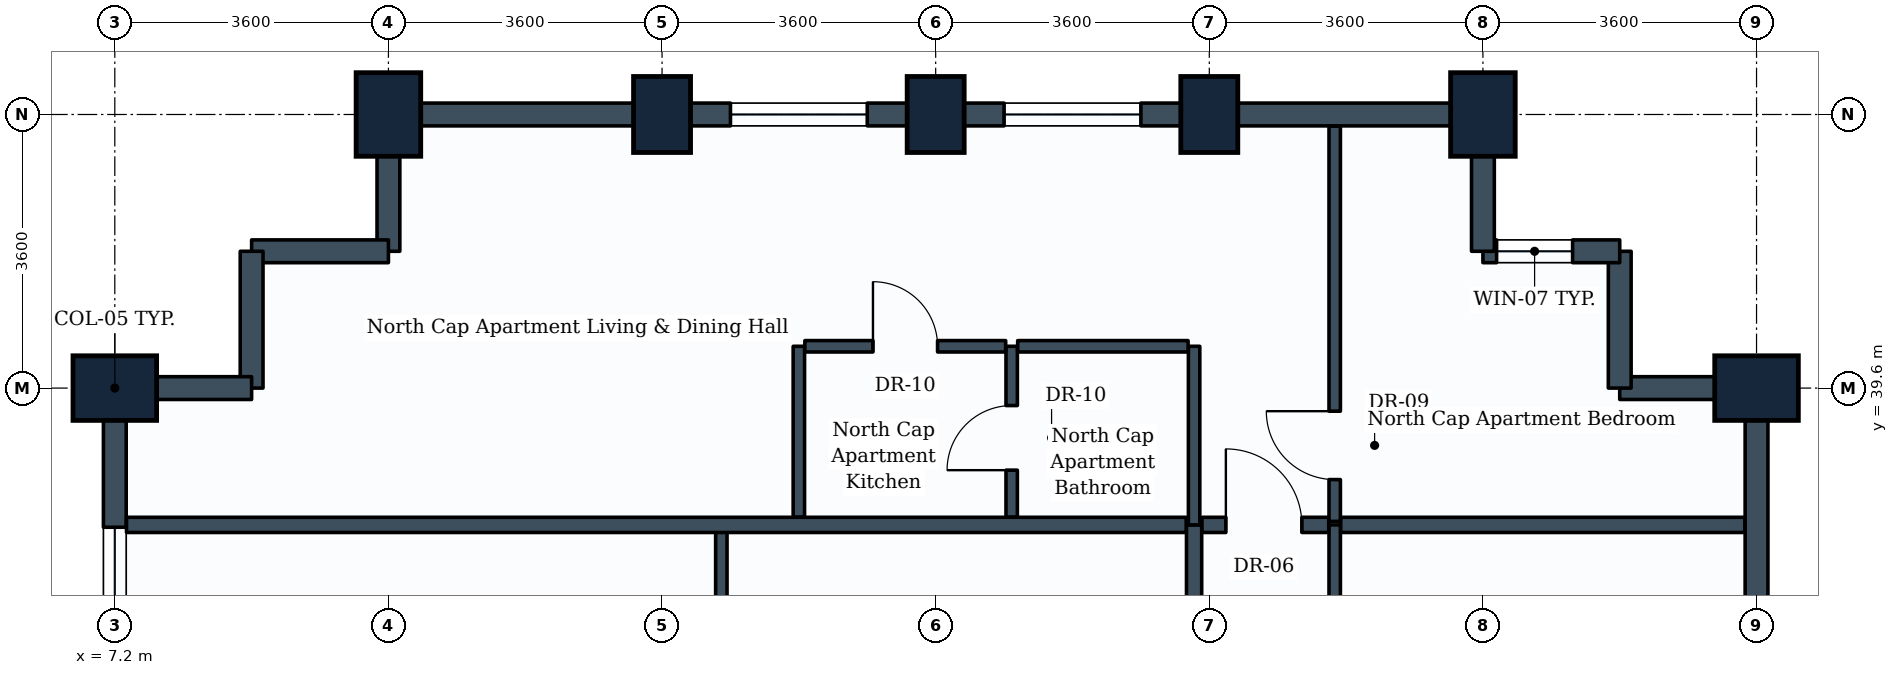
"""IFC4 building model, lengths in metres.
Left out: names, types, materials, properties, quantities, classifications, styles, units other than length and angle.
Written with IfcOpenShell. Run it as: python <this file> out.ifc"""

import sys

from ifc_helpers import new_model, si_unit, direction, frame, frame_2d, origin, origin_2d, place, context, subcontext, project, spatial, rectangle, extrude, element, fill, save


model = new_model("IFC4")
c1 = context("Model", 3, precision=1e-05, world=origin(), true_north=direction((0.0, 1.0)))
c2 = subcontext(c1, "Body", "Model", "MODEL_VIEW")
j1 = project(units=[si_unit("LENGTHUNIT", "METRE"), si_unit("PLANEANGLEUNIT", "RADIAN")], contexts=[c1])
p1 = place(None, origin())
s1 = spatial("IfcSite", under=j1, at=p1, CompositionType="ELEMENT")
p2 = place(p1, origin())
s2 = spatial("IfcBuilding", under=s1, at=p2, CompositionType="ELEMENT")
p3 = place(p2, frame((0.0, 0.0, 165.6)))
s3 = spatial("IfcBuildingStorey", under=s2, at=p3, CompositionType="ELEMENT", Elevation=165.6)
for number, where, z_axis, x_axis in (
    (1, (7.2, 39.6, 0.0), (0.0, 0.0, 1.0), (0.0, 1.0, 0.0)),
    (2, (10.8, 43.2, 0.0), (0.0, 0.0, 1.0), (1.0, 0.0, 0.0)),
):
    element("IfcColumn", number, at=place(p3, frame(where, z_axis=z_axis, x_axis=x_axis)), inside=s3, PredefinedType="COLUMN", context=c2, shape_type="SweptSolid", body=[
        extrude(rectangle(XDim=0.85, YDim=1.1, at=origin_2d()), origin(), (0.0, 0.0, 1.0), 3.8),
    ])
for number, where, z_axis, x_axis in (
    (3, (14.4, 43.2, 0.0), (0.0, 0.0, 1.0), (1.0, 0.0, 0.0)),
    (4, (18.0, 43.2, 0.0), (0.0, 0.0, 1.0), (1.0, 0.0, 0.0)),
    (5, (21.6, 43.2, 0.0), (0.0, 0.0, 1.0), (1.0, 0.0, 0.0)),
):
    element("IfcColumn", number, at=place(p3, frame(where, z_axis=z_axis, x_axis=x_axis)), inside=s3, PredefinedType="COLUMN", context=c2, shape_type="SweptSolid", body=[
        extrude(rectangle(XDim=0.75, YDim=1.0, at=origin_2d()), origin(), (0.0, 0.0, 1.0), 3.8),
    ])
for number, where, z_axis, x_axis in (
    (6, (25.2, 43.2, 0.0), (0.0, 0.0, 1.0), (1.0, 0.0, 0.0)),
    (7, (28.8, 39.6, 0.0), (0.0, 0.0, 1.0), (0.0, 1.0, 0.0)),
):
    element("IfcColumn", number, at=place(p3, frame(where, z_axis=z_axis, x_axis=x_axis)), inside=s3, PredefinedType="COLUMN", context=c2, shape_type="SweptSolid", body=[
        extrude(rectangle(XDim=0.85, YDim=1.1, at=origin_2d()), origin(), (0.0, 0.0, 1.0), 3.8),
    ])
p4 = place(p3, frame((28.8, 39.6, 0.0), z_axis=(0.0, 0.0, 1.0), x_axis=(0.0, -1.0, 0.0)))
e8 = element("IfcWall", 8, at=p4, inside=s3, PredefinedType="STANDARD", context=c2, shape_type="SweptSolid", body=[
    extrude(rectangle(XDim=3.6, YDim=0.3, at=frame_2d((1.8, 0.0))), origin(), (0.0, 0.0, 1.0), 2.93),
])
p5 = place(p3, frame((27.0, 39.6, 0.0), z_axis=(0.0, 0.0, 1.0), x_axis=(1.0, 0.0, 0.0)))
e9 = element("IfcWall", 9, at=p5, inside=s3, PredefinedType="STANDARD", context=c2, shape_type="SweptSolid", body=[
    extrude(rectangle(XDim=1.8, YDim=0.3, at=frame_2d((0.9, 0.0))), origin(), (0.0, 0.0, 1.0), 2.93),
])
p6 = place(p3, frame((27.0, 39.6, 0.0), z_axis=(0.0, 0.0, 1.0), x_axis=(0.0, 1.0, 0.0)))
e10 = element("IfcWall", 10, at=p6, inside=s3, PredefinedType="STANDARD", context=c2, shape_type="SweptSolid", body=[
    extrude(rectangle(XDim=1.8, YDim=0.3, at=frame_2d((0.9, 0.0))), origin(), (0.0, 0.0, 1.0), 3.465),
])
p7 = place(p3, frame((25.2, 41.4, 0.0), z_axis=(0.0, 0.0, 1.0), x_axis=(1.0, 0.0, 0.0)))
e11 = element("IfcWall", 11, at=p7, inside=s3, PredefinedType="STANDARD", context=c2, shape_type="SweptSolid", body=[
    extrude(rectangle(XDim=1.8, YDim=0.3, at=frame_2d((0.9, 0.0))), origin(), (0.0, 0.0, 1.0), 3.465),
])
p8 = place(p7, frame((0.18, 0.0, 0.85)))
e12 = element("IfcOpeningElement", 12, at=p8, cuts=e11, PredefinedType="OPENING", context=c2, shape_type="SweptSolid", body=[
    extrude(rectangle(XDim=1.0, YDim=1.35, at=frame_2d((0.5, 0.675))), frame((0.0, 0.16, 0.0), z_axis=(0.0, -1.0, 0.0), x_axis=(1.0, 0.0, 0.0)), (0.0, 0.0, 1.0), 0.32),
])
p9 = place(p3, frame((25.2, 41.4, 0.0), z_axis=(0.0, 0.0, 1.0), x_axis=(0.0, 1.0, 0.0)))
e13 = element("IfcWall", 13, at=p9, inside=s3, PredefinedType="STANDARD", context=c2, shape_type="SweptSolid", body=[
    extrude(rectangle(XDim=1.8, YDim=0.3, at=frame_2d((0.9, 0.0))), origin(), (0.0, 0.0, 1.0), 2.93),
])
p10 = place(p3, frame((21.6, 43.2, 0.0), z_axis=(0.0, 0.0, 1.0), x_axis=(1.0, 0.0, 0.0)))
e14 = element("IfcWall", 14, at=p10, inside=s3, PredefinedType="STANDARD", context=c2, shape_type="SweptSolid", body=[
    extrude(rectangle(XDim=3.6, YDim=0.3, at=frame_2d((1.8, 0.0))), origin(), (0.0, 0.0, 1.0), 2.93),
])
p11 = place(p3, frame((18.0, 43.2, 0.0), z_axis=(0.0, 0.0, 1.0), x_axis=(1.0, 0.0, 0.0)))
e15 = element("IfcWall", 15, at=p11, inside=s3, PredefinedType="STANDARD", context=c2, shape_type="SweptSolid", body=[
    extrude(rectangle(XDim=3.6, YDim=0.3, at=frame_2d((1.8, 0.0))), origin(), (0.0, 0.0, 1.0), 2.93),
])
p12 = place(p11, frame((0.9, 0.0, 0.85)))
e16 = element("IfcOpeningElement", 16, at=p12, cuts=e15, PredefinedType="OPENING", context=c2, shape_type="SweptSolid", body=[
    extrude(rectangle(XDim=1.8, YDim=1.35, at=frame_2d((0.9, 0.675))), frame((0.0, 0.16, 0.0), z_axis=(0.0, -1.0, 0.0), x_axis=(1.0, 0.0, 0.0)), (0.0, 0.0, 1.0), 0.32),
])
p13 = place(p3, frame((14.4, 43.2, 0.0), z_axis=(0.0, 0.0, 1.0), x_axis=(1.0, 0.0, 0.0)))
e17 = element("IfcWall", 17, at=p13, inside=s3, PredefinedType="STANDARD", context=c2, shape_type="SweptSolid", body=[
    extrude(rectangle(XDim=3.6, YDim=0.3, at=frame_2d((1.8, 0.0))), origin(), (0.0, 0.0, 1.0), 2.93),
])
p14 = place(p13, frame((0.9, 0.0, 0.85)))
e18 = element("IfcOpeningElement", 18, at=p14, cuts=e17, PredefinedType="OPENING", context=c2, shape_type="SweptSolid", body=[
    extrude(rectangle(XDim=1.8, YDim=1.35, at=frame_2d((0.9, 0.675))), frame((0.0, 0.16, 0.0), z_axis=(0.0, -1.0, 0.0), x_axis=(1.0, 0.0, 0.0)), (0.0, 0.0, 1.0), 0.32),
])
p15 = place(p3, frame((10.8, 43.2, 0.0), z_axis=(0.0, 0.0, 1.0), x_axis=(1.0, 0.0, 0.0)))
e19 = element("IfcWall", 19, at=p15, inside=s3, PredefinedType="STANDARD", context=c2, shape_type="SweptSolid", body=[
    extrude(rectangle(XDim=3.6, YDim=0.3, at=frame_2d((1.8, 0.0))), origin(), (0.0, 0.0, 1.0), 2.93),
])
p16 = place(p3, frame((10.8, 41.4, 0.0), z_axis=(0.0, 0.0, 1.0), x_axis=(0.0, 1.0, 0.0)))
e20 = element("IfcWall", 20, at=p16, inside=s3, PredefinedType="STANDARD", context=c2, shape_type="SweptSolid", body=[
    extrude(rectangle(XDim=1.8, YDim=0.3, at=frame_2d((0.9, 0.0))), origin(), (0.0, 0.0, 1.0), 2.93),
])
p17 = place(p3, frame((9.0, 41.4, 0.0), z_axis=(0.0, 0.0, 1.0), x_axis=(1.0, 0.0, 0.0)))
e21 = element("IfcWall", 21, at=p17, inside=s3, PredefinedType="STANDARD", context=c2, shape_type="SweptSolid", body=[
    extrude(rectangle(XDim=1.8, YDim=0.3, at=frame_2d((0.9, 0.0))), origin(), (0.0, 0.0, 1.0), 3.465),
])
p18 = place(p3, frame((9.0, 39.6, 0.0), z_axis=(0.0, 0.0, 1.0), x_axis=(0.0, 1.0, 0.0)))
e22 = element("IfcWall", 22, at=p18, inside=s3, PredefinedType="STANDARD", context=c2, shape_type="SweptSolid", body=[
    extrude(rectangle(XDim=1.8, YDim=0.3, at=frame_2d((0.9, 0.0))), origin(), (0.0, 0.0, 1.0), 3.465),
])
p19 = place(p3, frame((7.2, 39.6, 0.0), z_axis=(0.0, 0.0, 1.0), x_axis=(1.0, 0.0, 0.0)))
e23 = element("IfcWall", 23, at=p19, inside=s3, PredefinedType="STANDARD", context=c2, shape_type="SweptSolid", body=[
    extrude(rectangle(XDim=1.8, YDim=0.3, at=frame_2d((0.9, 0.0))), origin(), (0.0, 0.0, 1.0), 2.93),
])
p20 = place(p3, frame((7.2, 36.0, 0.0), z_axis=(0.0, 0.0, 1.0), x_axis=(0.0, 1.0, 0.0)))
e24 = element("IfcWall", 24, at=p20, inside=s3, PredefinedType="STANDARD", context=c2, shape_type="SweptSolid", body=[
    extrude(rectangle(XDim=3.6, YDim=0.3, at=frame_2d((1.8, 0.0))), origin(), (0.0, 0.0, 1.0), 2.93),
])
p21 = place(p20, frame((0.769, 0.0, 0.85)))
e25 = element("IfcOpeningElement", 25, at=p21, cuts=e24, PredefinedType="OPENING", context=c2, shape_type="SweptSolid", body=[
    extrude(rectangle(XDim=1.0, YDim=1.35, at=frame_2d((0.5, 0.675))), frame((0.0, 0.16, 0.0), z_axis=(0.0, -1.0, 0.0), x_axis=(1.0, 0.0, 0.0)), (0.0, 0.0, 1.0), 0.32),
])
p22 = place(p3, frame((21.4, 34.26, 0.0), z_axis=(0.0, 0.0, 1.0), x_axis=(0.0, 1.0, 0.0)))
e26 = element("IfcWall", 26, at=p22, inside=s3, PredefinedType="PARTITIONING", context=c2, shape_type="SweptSolid", body=[
    extrude(rectangle(XDim=3.54, YDim=0.2, at=frame_2d((1.77, 0.0))), origin(), (0.0, 0.0, 1.0), 3.1),
])
p23 = place(p22, frame((1.23, 0.0, 0.0)))
e27 = element("IfcOpeningElement", 27, at=p23, cuts=e26, PredefinedType="OPENING", context=c2, shape_type="SweptSolid", body=[
    extrude(rectangle(XDim=1.0, YDim=2.1, at=frame_2d((0.5, 1.05))), frame((0.0, 0.11, 0.0), z_axis=(0.0, -1.0, 0.0), x_axis=(1.0, 0.0, 0.0)), (0.0, 0.0, 1.0), 0.22),
])
p24 = place(p3, frame((15.18, 34.46, 0.0), z_axis=(0.0, 0.0, 1.0), x_axis=(0.0, 1.0, 0.0)))
e28 = element("IfcWall", 28, at=p24, inside=s3, PredefinedType="PARTITIONING", context=c2, shape_type="SweptSolid", body=[
    extrude(rectangle(XDim=3.34, YDim=0.15, at=frame_2d((1.67, 0.0))), origin(), (0.0, 0.0, 1.0), 3.1),
])
p25 = place(p24, frame((1.22, 0.0, 0.0)))
e29 = element("IfcOpeningElement", 29, at=p25, cuts=e28, PredefinedType="OPENING", context=c2, shape_type="SweptSolid", body=[
    extrude(rectangle(XDim=0.9, YDim=2.1, at=frame_2d((0.45, 1.05))), frame((0.0, 0.085, 0.0), z_axis=(0.0, -1.0, 0.0), x_axis=(1.0, 0.0, 0.0)), (0.0, 0.0, 1.0), 0.17),
])
p26 = place(p3, frame((23.25, 26.879, 0.0), z_axis=(0.0, 0.0, 1.0), x_axis=(0.0, 1.0, 0.0)))
e30 = element("IfcWall", 30, at=p26, inside=s3, PredefinedType="PARTITIONING", context=c2, shape_type="SweptSolid", body=[
    extrude(rectangle(XDim=10.921, YDim=0.15, at=frame_2d((5.46, 0.0))), origin(), (0.0, 0.0, 1.0), 3.1),
])
p27 = place(p26, frame((4.881, 0.0, 0.0)))
e31 = element("IfcOpeningElement", 31, at=p27, cuts=e30, PredefinedType="OPENING", context=c2, shape_type="SweptSolid", body=[
    extrude(rectangle(XDim=1.0, YDim=2.1, at=frame_2d((0.5, 1.05))), frame((0.0, 0.085, 0.0), z_axis=(0.0, -1.0, 0.0), x_axis=(1.0, 0.0, 0.0)), (0.0, 0.0, 1.0), 0.17),
])
p28 = place(p3, frame((7.354, 37.8, 0.0), z_axis=(0.0, 0.0, 1.0), x_axis=(1.0, 0.0, 0.0)))
e32 = element("IfcWall", 32, at=p28, inside=s3, PredefinedType="PARTITIONING", context=c2, shape_type="SweptSolid", body=[
    extrude(rectangle(XDim=13.942, YDim=0.2, at=frame_2d((6.971, 0.0))), origin(), (0.0, 0.0, 1.0), 2.93),
])
p29 = place(p3, frame((23.329, 37.8, 0.0), z_axis=(0.0, 0.0, 1.0), x_axis=(1.0, 0.0, 0.0)))
e33 = element("IfcWall", 33, at=p29, inside=s3, PredefinedType="PARTITIONING", context=c2, shape_type="SweptSolid", body=[
    extrude(rectangle(XDim=5.317, YDim=0.2, at=frame_2d((2.658, 0.0))), origin(), (0.0, 0.0, 1.0), 2.93),
])
p30 = place(p3, frame((21.504, 37.8, 0.0), z_axis=(0.0, 0.0, 1.0), x_axis=(1.0, 0.0, 0.0)))
e34 = element("IfcWall", 34, at=p30, inside=s3, PredefinedType="PARTITIONING", context=c2, shape_type="SweptSolid", body=[
    extrude(rectangle(XDim=1.667, YDim=0.2, at=frame_2d((0.833, 0.0))), origin(), (0.0, 0.0, 1.0), 3.465),
])
p31 = place(p30, frame((0.314, 0.0, 0.0)))
e35 = element("IfcOpeningElement", 35, at=p31, cuts=e34, PredefinedType="OPENING", context=c2, shape_type="SweptSolid", body=[
    extrude(rectangle(XDim=1.0, YDim=2.1, at=frame_2d((0.5, 1.05))), frame((0.0, 0.11, 0.0), z_axis=(0.0, -1.0, 0.0), x_axis=(1.0, 0.0, 0.0)), (0.0, 0.0, 1.0), 0.22),
])
p32 = place(p3, frame((21.4, 37.8, 0.0), z_axis=(0.0, 0.0, 1.0), x_axis=(0.0, 1.0, 0.0)))
e36 = element("IfcWall", 36, at=p32, inside=s3, PredefinedType="PARTITIONING", context=c2, shape_type="SweptSolid", body=[
    extrude(rectangle(XDim=2.35, YDim=0.15, at=frame_2d((1.175, 0.0))), origin(), (0.0, 0.0, 1.0), 3.465),
])
p33 = place(p3, frame((19.0, 37.904, 0.0), z_axis=(0.0, 0.0, 1.0), x_axis=(0.0, 1.0, 0.0)))
e37 = element("IfcWall", 37, at=p33, inside=s3, PredefinedType="PARTITIONING", context=c2, shape_type="SweptSolid", body=[
    extrude(rectangle(XDim=2.246, YDim=0.15, at=frame_2d((1.123, 0.0))), origin(), (0.0, 0.0, 1.0), 3.465),
])
p34 = place(p33, frame((0.616, 0.0, 0.0)))
e38 = element("IfcOpeningElement", 38, at=p34, cuts=e37, PredefinedType="OPENING", context=c2, shape_type="SweptSolid", body=[
    extrude(rectangle(XDim=0.85, YDim=2.1, at=frame_2d((0.425, 1.05))), frame((0.0, 0.085, 0.0), z_axis=(0.0, -1.0, 0.0), x_axis=(1.0, 0.0, 0.0)), (0.0, 0.0, 1.0), 0.17),
])
p35 = place(p3, frame((19.079, 40.15, 0.0), z_axis=(0.0, 0.0, 1.0), x_axis=(1.0, 0.0, 0.0)))
e39 = element("IfcWall", 39, at=p35, inside=s3, PredefinedType="PARTITIONING", context=c2, shape_type="SweptSolid", body=[
    extrude(rectangle(XDim=2.242, YDim=0.15, at=frame_2d((1.121, 0.0))), origin(), (0.0, 0.0, 1.0), 3.465),
])
p36 = place(p3, frame((23.25, 37.846, 0.0), z_axis=(0.0, 0.0, 1.0), x_axis=(0.0, 1.0, 0.0)))
e40 = element("IfcWall", 40, at=p36, inside=s3, PredefinedType="PARTITIONING", context=c2, shape_type="SweptSolid", body=[
    extrude(rectangle(XDim=5.2, YDim=0.15, at=frame_2d((2.6, 0.0))), origin(), (0.0, 0.0, 1.0), 2.93),
])
p37 = place(p36, frame((0.55, 0.0, 0.0)))
e41 = element("IfcOpeningElement", 41, at=p37, cuts=e40, PredefinedType="OPENING", context=c2, shape_type="SweptSolid", body=[
    extrude(rectangle(XDim=0.9, YDim=2.1, at=frame_2d((0.45, 1.05))), frame((0.0, 0.085, 0.0), z_axis=(0.0, -1.0, 0.0), x_axis=(1.0, 0.0, 0.0)), (0.0, 0.0, 1.0), 0.17),
])
p38 = place(p3, frame((16.2, 37.904, 0.0), z_axis=(0.0, 0.0, 1.0), x_axis=(0.0, 1.0, 0.0)))
e42 = element("IfcWall", 42, at=p38, inside=s3, PredefinedType="PARTITIONING", context=c2, shape_type="SweptSolid", body=[
    extrude(rectangle(XDim=2.246, YDim=0.15, at=frame_2d((1.123, 0.0))), origin(), (0.0, 0.0, 1.0), 3.465),
])
p39 = place(p3, frame((16.279, 40.15, 0.0), z_axis=(0.0, 0.0, 1.0), x_axis=(1.0, 0.0, 0.0)))
e43 = element("IfcWall", 43, at=p39, inside=s3, PredefinedType="PARTITIONING", context=c2, shape_type="SweptSolid", body=[
    extrude(rectangle(XDim=2.642, YDim=0.15, at=frame_2d((1.321, 0.0))), origin(), (0.0, 0.0, 1.0), 3.1),
])
p40 = place(p39, frame((0.896, 0.0, 0.0)))
e44 = element("IfcOpeningElement", 44, at=p40, cuts=e43, PredefinedType="OPENING", context=c2, shape_type="SweptSolid", body=[
    extrude(rectangle(XDim=0.85, YDim=2.1, at=frame_2d((0.425, 1.05))), frame((0.0, 0.085, 0.0), z_axis=(0.0, -1.0, 0.0), x_axis=(1.0, 0.0, 0.0)), (0.0, 0.0, 1.0), 0.17),
])
p41 = place(p12, origin())
e45 = element("IfcWindow", 45, at=p41, inside=s3, PartitioningType="SINGLE_PANEL", PredefinedType="WINDOW", context=c2, shape_type="SweptSolid", body=[
    extrude(rectangle(XDim=1.8, YDim=1.35, at=frame_2d((0.9, 0.675))), frame((0.0, 0.03, 0.0), z_axis=(0.0, -1.0, 0.0), x_axis=(1.0, 0.0, 0.0)), (0.0, 0.0, 1.0), 0.06),
])
fill(e16, e45)
p42 = place(p14, origin())
e46 = element("IfcWindow", 46, at=p42, inside=s3, PartitioningType="SINGLE_PANEL", PredefinedType="WINDOW", context=c2, shape_type="SweptSolid", body=[
    extrude(rectangle(XDim=1.8, YDim=1.35, at=frame_2d((0.9, 0.675))), frame((0.0, 0.03, 0.0), z_axis=(0.0, -1.0, 0.0), x_axis=(1.0, 0.0, 0.0)), (0.0, 0.0, 1.0), 0.06),
])
fill(e18, e46)
p43 = place(p31, origin())
e47 = element("IfcDoor", 47, at=p43, inside=s3, OperationType="SINGLE_SWING_LEFT", PredefinedType="DOOR", context=c2, shape_type="SweptSolid", body=[
    extrude(rectangle(XDim=1.0, YDim=2.1, at=frame_2d((0.5, 1.05))), frame((0.0, 0.025, 0.0), z_axis=(0.0, -1.0, 0.0), x_axis=(1.0, 0.0, 0.0)), (0.0, 0.0, 1.0), 0.05),
])
fill(e35, e47)
p44 = place(p34, origin())
e48 = element("IfcDoor", 48, at=p44, inside=s3, OperationType="SINGLE_SWING_LEFT", PredefinedType="DOOR", context=c2, shape_type="SweptSolid", body=[
    extrude(rectangle(XDim=0.85, YDim=2.1, at=frame_2d((0.425, 1.05))), frame((0.0, 0.025, 0.0), z_axis=(0.0, -1.0, 0.0), x_axis=(1.0, 0.0, 0.0)), (0.0, 0.0, 1.0), 0.05),
])
fill(e38, e48)
p45 = place(p37, origin())
e49 = element("IfcDoor", 49, at=p45, inside=s3, OperationType="SINGLE_SWING_RIGHT", PredefinedType="DOOR", context=c2, shape_type="SweptSolid", body=[
    extrude(rectangle(XDim=0.9, YDim=2.1, at=frame_2d((0.45, 1.05))), frame((0.0, 0.025, 0.0), z_axis=(0.0, -1.0, 0.0), x_axis=(1.0, 0.0, 0.0)), (0.0, 0.0, 1.0), 0.05),
])
fill(e41, e49)
p46 = place(p40, origin())
e50 = element("IfcDoor", 50, at=p46, inside=s3, OperationType="SINGLE_SWING_LEFT", PredefinedType="DOOR", context=c2, shape_type="SweptSolid", body=[
    extrude(rectangle(XDim=0.85, YDim=2.1, at=frame_2d((0.425, 1.05))), frame((0.0, 0.025, 0.0), z_axis=(0.0, -1.0, 0.0), x_axis=(1.0, 0.0, 0.0)), (0.0, 0.0, 1.0), 0.05),
])
fill(e44, e50)
p47 = place(p21, origin())
e51 = element("IfcWindow", 51, at=p47, inside=s3, PartitioningType="SINGLE_PANEL", PredefinedType="WINDOW", context=c2, shape_type="SweptSolid", body=[
    extrude(rectangle(XDim=1.0, YDim=1.35, at=frame_2d((0.5, 0.675))), frame((0.0, 0.03, 0.0), z_axis=(0.0, -1.0, 0.0), x_axis=(1.0, 0.0, 0.0)), (0.0, 0.0, 1.0), 0.06),
])
fill(e25, e51)
p48 = place(p8, origin())
e52 = element("IfcWindow", 52, at=p48, inside=s3, PartitioningType="SINGLE_PANEL", PredefinedType="WINDOW", context=c2, shape_type="SweptSolid", body=[
    extrude(rectangle(XDim=1.0, YDim=1.35, at=frame_2d((0.5, 0.675))), frame((0.0, 0.03, 0.0), z_axis=(0.0, -1.0, 0.0), x_axis=(1.0, 0.0, 0.0)), (0.0, 0.0, 1.0), 0.06),
])
fill(e12, e52)
save(model, sys.argv[1])
